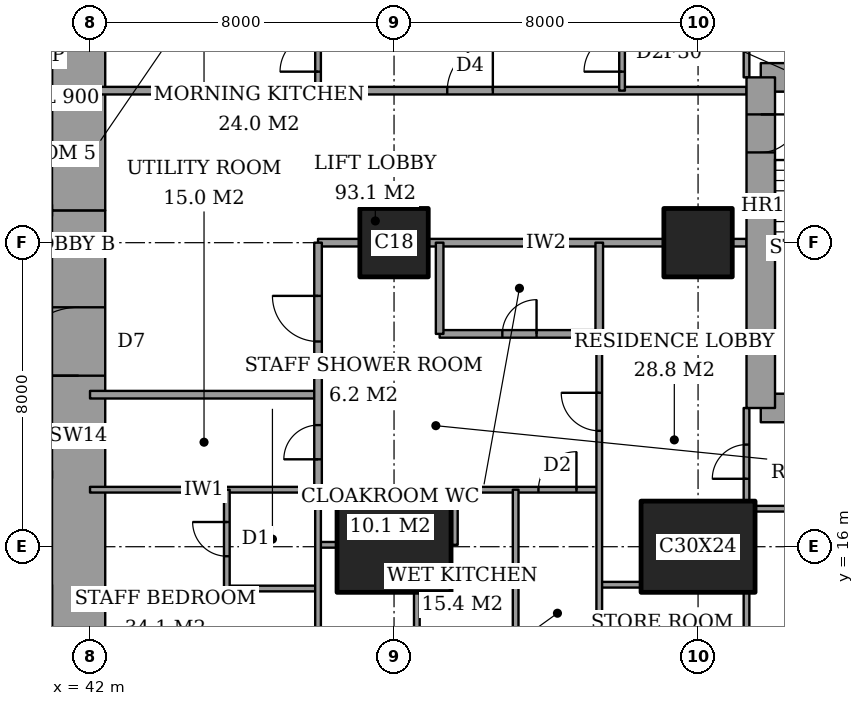
"""IFC4 building model, lengths in metres.
Left out: names, types, materials, properties, quantities, classifications, styles, units other than length and angle.
Written with IfcOpenShell. Run it as: python <this file> out.ifc"""

import sys

from ifc_helpers import new_model, si_unit, direction, frame, frame_2d, origin, origin_2d, place, context, subcontext, project, spatial, rectangle, extrude, element, fill, save


model = new_model("IFC4")
c1 = context("Model", 3, precision=1e-05, world=origin(), true_north=direction((0.0, 1.0)))
c2 = subcontext(c1, "Body", "Model", "MODEL_VIEW")
j1 = project(units=[si_unit("LENGTHUNIT", "METRE"), si_unit("PLANEANGLEUNIT", "RADIAN")], contexts=[c1])
p1 = place(None, origin())
s1 = spatial("IfcSite", under=j1, at=p1, CompositionType="ELEMENT")
p2 = place(p1, origin())
s2 = spatial("IfcBuilding", under=s1, at=p2, CompositionType="ELEMENT")
p3 = place(p2, frame((0.0, 0.0, 211.0)))
s3 = spatial("IfcBuildingStorey", under=s2, at=p3, CompositionType="ELEMENT", Elevation=211.0)
p4 = place(p3, frame((50.0, 16.0, 0.0), z_axis=(0.0, 0.0, 1.0), x_axis=(1.0, 0.0, 0.0)))
e1 = element("IfcColumn", 1, at=p4, inside=s3, PredefinedType="COLUMN", context=c2, shape_type="SweptSolid", body=[
    extrude(rectangle(XDim=3.0, YDim=2.4, at=origin_2d()), origin(), (0.0, 0.0, 1.0), 3.6),
])
p5 = place(p3, frame((50.0, 24.0, 0.0), z_axis=(0.0, 0.0, 1.0), x_axis=(1.0, 0.0, 0.0)))
e2 = element("IfcColumn", 2, at=p5, inside=s3, PredefinedType="COLUMN", context=c2, shape_type="SweptSolid", body=[
    extrude(rectangle(XDim=1.8, YDim=1.8, at=origin_2d()), origin(), (0.0, 0.0, 1.0), 3.6),
])
p6 = place(p3, frame((58.0, 16.0, 0.0), z_axis=(0.0, 0.0, 1.0), x_axis=(1.0, 0.0, 0.0)))
e3 = element("IfcColumn", 3, at=p6, inside=s3, PredefinedType="COLUMN", context=c2, shape_type="SweptSolid", body=[
    extrude(rectangle(XDim=3.0, YDim=2.4, at=origin_2d()), origin(), (0.0, 0.0, 1.0), 3.6),
])
p7 = place(p3, frame((58.0, 24.0, 0.0), z_axis=(0.0, 0.0, 1.0), x_axis=(1.0, 0.0, 0.0)))
e4 = element("IfcColumn", 4, at=p7, inside=s3, PredefinedType="COLUMN", context=c2, shape_type="SweptSolid", body=[
    extrude(rectangle(XDim=1.8, YDim=1.8, at=origin_2d()), origin(), (0.0, 0.0, 1.0), 3.6),
])
p8 = place(p3, frame((41.7, 13.0, 0.0), z_axis=(0.0, 0.0, 1.0), x_axis=(0.0, 1.0, 0.0)))
e5 = element("IfcWall", 5, at=p8, inside=s3, PredefinedType="SHEAR", context=c2, shape_type="SweptSolid", body=[
    extrude(rectangle(XDim=11.85, YDim=1.4, at=frame_2d((5.925, 0.0))), origin(), (0.0, 0.0, 1.0), 3.6),
])
p9 = place(p8, frame((7.5, 0.0, 0.0)))
e6 = element("IfcOpeningElement", 6, at=p9, cuts=e5, PredefinedType="OPENING", context=c2, shape_type="SweptSolid", body=[
    extrude(rectangle(XDim=1.8, YDim=2.4, at=frame_2d((0.9, 1.2))), frame((0.0, 0.71, 0.0), z_axis=(0.0, -1.0, 0.0), x_axis=(1.0, 0.0, 0.0)), (0.0, 0.0, 1.0), 1.42),
])
p10 = place(p3, frame((41.7, 24.85, 0.0), z_axis=(0.0, 0.0, 1.0), x_axis=(0.0, 1.0, 0.0)))
e7 = element("IfcWall", 7, at=p10, inside=s3, PredefinedType="SHEAR", context=c2, shape_type="SweptSolid", body=[
    extrude(rectangle(XDim=10.15, YDim=1.4, at=frame_2d((5.075, 0.0))), origin(), (0.0, 0.0, 1.0), 3.6),
])
for number, where, z_axis, x_axis in (
    (8, (59.65, 19.65, 0.0), (0.0, 0.0, 1.0), (1.0, 0.0, 0.0)),
    (9, (64.1, 28.35, 0.0), (0.0, 0.0, 1.0), (-1.0, 0.0, 0.0)),
):
    element("IfcWall", number, at=place(p3, frame(where, z_axis=z_axis, x_axis=x_axis)), inside=s3, PredefinedType="SHEAR", context=c2, shape_type="SweptSolid", body=[
        extrude(rectangle(XDim=4.45, YDim=0.75, at=frame_2d((2.225, 0.0))), origin(), (0.0, 0.0, 1.0), 3.6),
    ])
p11 = place(p3, frame((59.65, 28.35, 0.0), z_axis=(0.0, 0.0, 1.0), x_axis=(0.0, -1.0, 0.0)))
e10 = element("IfcWall", 10, at=p11, inside=s3, PredefinedType="SHEAR", context=c2, shape_type="SweptSolid", body=[
    extrude(rectangle(XDim=8.7, YDim=0.75, at=frame_2d((4.35, 0.0))), origin(), (0.0, 0.0, 1.0), 3.6),
])
p12 = place(p11, frame((0.975, 0.0, 0.0)))
e11 = element("IfcOpeningElement", 11, at=p12, cuts=e10, PredefinedType="OPENING", context=c2, shape_type="SweptSolid", body=[
    extrude(rectangle(XDim=1.0, YDim=2.1, at=frame_2d((0.5, 1.05))), frame((0.0, 0.385, 0.0), z_axis=(0.0, -1.0, 0.0), x_axis=(1.0, 0.0, 0.0)), (0.0, 0.0, 1.0), 0.77),
])
p13 = place(p3, frame((45.6, 14.9, 0.0), z_axis=(0.0, 0.0, 1.0), x_axis=(1.0, 0.0, 0.0)))
e12 = element("IfcWall", 12, at=p13, inside=s3, PredefinedType="PARTITIONING", context=c2, shape_type="SweptSolid", body=[
    extrude(rectangle(XDim=2.4, YDim=0.15, at=frame_2d((1.2, 0.0))), origin(), (0.0, 0.0, 1.0), 3.35),
])
p14 = place(p3, frame((55.4, 15.0, 0.0), z_axis=(0.0, 0.0, 1.0), x_axis=(1.0, 0.0, 0.0)))
e13 = element("IfcWall", 13, at=p14, inside=s3, PredefinedType="PARTITIONING", context=c2, shape_type="SweptSolid", body=[
    extrude(rectangle(XDim=1.1, YDim=0.15, at=frame_2d((0.55, 0.0))), origin(), (0.0, 0.0, 1.0), 3.35),
])
p15 = place(p3, frame((48.0, 16.05, 0.0), z_axis=(0.0, 0.0, 1.0), x_axis=(1.0, 0.0, 0.0)))
e14 = element("IfcWall", 14, at=p15, inside=s3, PredefinedType="PARTITIONING", context=c2, shape_type="SweptSolid", body=[
    extrude(rectangle(XDim=0.5, YDim=0.15, at=frame_2d((0.25, 0.0))), origin(), (0.0, 0.0, 1.0), 2.634),
])
p16 = place(p3, frame((59.5, 17.0, 0.0), z_axis=(0.0, 0.0, 1.0), x_axis=(1.0, 0.0, 0.0)))
e15 = element("IfcWall", 15, at=p16, inside=s3, PredefinedType="PARTITIONING", context=c2, shape_type="SweptSolid", body=[
    extrude(rectangle(XDim=6.95, YDim=0.15, at=frame_2d((3.475, 0.0))), origin(), (0.0, 0.0, 1.0), 3.35),
])
p17 = place(p3, frame((42.0, 17.5, 0.0), z_axis=(0.0, 0.0, 1.0), x_axis=(1.0, 0.0, 0.0)))
e16 = element("IfcWall", 16, at=p17, inside=s3, PredefinedType="PARTITIONING", context=c2, shape_type="SweptSolid", body=[
    extrude(rectangle(XDim=6.0, YDim=0.15, at=frame_2d((3.0, 0.0))), origin(), (0.0, 0.0, 1.0), 3.35),
])
p18 = place(p3, frame((51.6, 17.5, 0.0), z_axis=(0.0, 0.0, 1.0), x_axis=(1.0, 0.0, 0.0)))
e17 = element("IfcWall", 17, at=p18, inside=s3, PredefinedType="PARTITIONING", context=c2, shape_type="SweptSolid", body=[
    extrude(rectangle(XDim=3.8, YDim=0.15, at=frame_2d((1.9, 0.0))), origin(), (0.0, 0.0, 1.0), 3.35),
])
p19 = place(p18, frame((2.2, 0.0, 0.0)))
e18 = element("IfcOpeningElement", 18, at=p19, cuts=e17, PredefinedType="OPENING", context=c2, shape_type="SweptSolid", body=[
    extrude(rectangle(XDim=1.0, YDim=2.1, at=frame_2d((0.5, 1.05))), frame((0.0, 0.085, 0.0), z_axis=(0.0, -1.0, 0.0), x_axis=(1.0, 0.0, 0.0)), (0.0, 0.0, 1.0), 0.17),
])
p20 = place(p3, frame((42.0, 20.0, 0.0), z_axis=(0.0, 0.0, 1.0), x_axis=(1.0, 0.0, 0.0)))
e19 = element("IfcWall", 19, at=p20, inside=s3, PredefinedType="PARTITIONING", context=c2, shape_type="SweptSolid", body=[
    extrude(rectangle(XDim=6.0, YDim=0.2, at=frame_2d((3.0, 0.0))), origin(), (0.0, 0.0, 1.0), 3.35),
])
p21 = place(p3, frame((51.2, 21.6, 0.0), z_axis=(0.0, 0.0, 1.0), x_axis=(1.0, 0.0, 0.0)))
e20 = element("IfcWall", 20, at=p21, inside=s3, PredefinedType="PARTITIONING", context=c2, shape_type="SweptSolid", body=[
    extrude(rectangle(XDim=4.2, YDim=0.2, at=frame_2d((2.1, 0.0))), origin(), (0.0, 0.0, 1.0), 3.35),
])
p22 = place(p21, frame((1.65, 0.0, 0.0)))
e21 = element("IfcOpeningElement", 21, at=p22, cuts=e20, PredefinedType="OPENING", context=c2, shape_type="SweptSolid", body=[
    extrude(rectangle(XDim=0.9, YDim=2.1, at=frame_2d((0.45, 1.05))), frame((0.0, 0.11, 0.0), z_axis=(0.0, -1.0, 0.0), x_axis=(1.0, 0.0, 0.0)), (0.0, 0.0, 1.0), 0.22),
])
p23 = place(p3, frame((48.0, 24.0, 0.0), z_axis=(0.0, 0.0, 1.0), x_axis=(1.0, 0.0, 0.0)))
e22 = element("IfcWall", 22, at=p23, inside=s3, PredefinedType="PARTITIONING", context=c2, shape_type="SweptSolid", body=[
    extrude(rectangle(XDim=1.1, YDim=0.2, at=frame_2d((0.55, 0.0))), origin(), (0.0, 0.0, 1.0), 3.35),
])
p24 = place(p3, frame((50.9, 24.0, 0.0), z_axis=(0.0, 0.0, 1.0), x_axis=(1.0, 0.0, 0.0)))
e23 = element("IfcWall", 23, at=p24, inside=s3, PredefinedType="PARTITIONING", context=c2, shape_type="SweptSolid", body=[
    extrude(rectangle(XDim=6.2, YDim=0.2, at=frame_2d((3.1, 0.0))), origin(), (0.0, 0.0, 1.0), 3.35),
])
p25 = place(p3, frame((58.9, 24.0, 0.0), z_axis=(0.0, 0.0, 1.0), x_axis=(1.0, 0.0, 0.0)))
e24 = element("IfcWall", 24, at=p25, inside=s3, PredefinedType="PARTITIONING", context=c2, shape_type="SweptSolid", body=[
    extrude(rectangle(XDim=0.375, YDim=0.2, at=frame_2d((0.188, 0.0))), origin(), (0.0, 0.0, 1.0), 3.35),
])
p26 = place(p3, frame((42.0, 28.0, 0.0), z_axis=(0.0, 0.0, 1.0), x_axis=(1.0, 0.0, 0.0)))
e25 = element("IfcWall", 25, at=p26, inside=s3, PredefinedType="PARTITIONING", context=c2, shape_type="SweptSolid", body=[
    extrude(rectangle(XDim=17.275, YDim=0.2, at=frame_2d((8.637, 0.0))), origin(), (0.0, 0.0, 1.0), 3.35),
])
p27 = place(p26, frame((9.4, 0.0, 0.0)))
e26 = element("IfcOpeningElement", 26, at=p27, cuts=e25, PredefinedType="OPENING", context=c2, shape_type="SweptSolid", body=[
    extrude(rectangle(XDim=1.2, YDim=2.4, at=frame_2d((0.6, 1.2))), frame((0.0, 0.11, 0.0), z_axis=(0.0, -1.0, 0.0), x_axis=(1.0, 0.0, 0.0)), (0.0, 0.0, 1.0), 0.22),
])
p28 = place(p3, frame((45.6, 14.9, 0.0), z_axis=(0.0, 0.0, 1.0), x_axis=(0.0, 1.0, 0.0)))
e27 = element("IfcWall", 27, at=p28, inside=s3, PredefinedType="PARTITIONING", context=c2, shape_type="SweptSolid", body=[
    extrude(rectangle(XDim=2.6, YDim=0.15, at=frame_2d((1.3, 0.0))), origin(), (0.0, 0.0, 1.0), 3.35),
])
p29 = place(p28, frame((0.85, 0.0, 0.0)))
e28 = element("IfcOpeningElement", 28, at=p29, cuts=e27, PredefinedType="OPENING", context=c2, shape_type="SweptSolid", body=[
    extrude(rectangle(XDim=0.9, YDim=2.1, at=frame_2d((0.45, 1.05))), frame((0.0, 0.085, 0.0), z_axis=(0.0, -1.0, 0.0), x_axis=(1.0, 0.0, 0.0)), (0.0, 0.0, 1.0), 0.17),
])
p30 = place(p3, frame((48.0, 17.5, 0.0), z_axis=(0.0, 0.0, 1.0), x_axis=(0.0, 1.0, 0.0)))
e29 = element("IfcWall", 29, at=p30, inside=s3, PredefinedType="PARTITIONING", context=c2, shape_type="SweptSolid", body=[
    extrude(rectangle(XDim=6.5, YDim=0.2, at=frame_2d((3.25, 0.0))), origin(), (0.0, 0.0, 1.0), 3.35),
])
p31 = place(p30, frame((3.9, 0.0, 0.0)))
e30 = element("IfcOpeningElement", 30, at=p31, cuts=e29, PredefinedType="OPENING", context=c2, shape_type="SweptSolid", body=[
    extrude(rectangle(XDim=1.2, YDim=2.4, at=frame_2d((0.6, 1.2))), frame((0.0, 0.11, 0.0), z_axis=(0.0, -1.0, 0.0), x_axis=(1.0, 0.0, 0.0)), (0.0, 0.0, 1.0), 0.22),
])
p32 = place(p30, frame((0.8, 0.0, 0.0)))
e31 = element("IfcOpeningElement", 31, at=p32, cuts=e29, PredefinedType="OPENING", context=c2, shape_type="SweptSolid", body=[
    extrude(rectangle(XDim=0.9, YDim=2.1, at=frame_2d((0.45, 1.05))), frame((0.0, 0.11, 0.0), z_axis=(0.0, -1.0, 0.0), x_axis=(1.0, 0.0, 0.0)), (0.0, 0.0, 1.0), 0.22),
])
p33 = place(p3, frame((48.0, 11.0, 0.0), z_axis=(0.0, 0.0, 1.0), x_axis=(0.0, 1.0, 0.0)))
e32 = element("IfcWall", 32, at=p33, inside=s3, PredefinedType="PARTITIONING", context=c2, shape_type="SweptSolid", body=[
    extrude(rectangle(XDim=6.5, YDim=0.15, at=frame_2d((3.25, 0.0))), origin(), (0.0, 0.0, 1.0), 3.35),
])
p34 = place(p3, frame((48.0, 28.0, 0.0), z_axis=(0.0, 0.0, 1.0), x_axis=(0.0, 1.0, 0.0)))
e33 = element("IfcWall", 33, at=p34, inside=s3, PredefinedType="PARTITIONING", context=c2, shape_type="SweptSolid", body=[
    extrude(rectangle(XDim=9.4, YDim=0.15, at=frame_2d((4.7, 0.0))), origin(), (0.0, 0.0, 1.0), 3.35),
])
p35 = place(p34, frame((0.5, 0.0, 0.0)))
e34 = element("IfcOpeningElement", 34, at=p35, cuts=e33, PredefinedType="OPENING", context=c2, shape_type="SweptSolid", body=[
    extrude(rectangle(XDim=1.0, YDim=2.1, at=frame_2d((0.5, 1.05))), frame((0.0, 0.085, 0.0), z_axis=(0.0, -1.0, 0.0), x_axis=(1.0, 0.0, 0.0)), (0.0, 0.0, 1.0), 0.17),
])
p36 = place(p3, frame((50.6, 11.0, 0.0), z_axis=(0.0, 0.0, 1.0), x_axis=(0.0, 1.0, 0.0)))
e35 = element("IfcWall", 35, at=p36, inside=s3, PredefinedType="PARTITIONING", context=c2, shape_type="SweptSolid", body=[
    extrude(rectangle(XDim=3.8, YDim=0.15, at=frame_2d((1.9, 0.0))), origin(), (0.0, 0.0, 1.0), 3.35),
])
p37 = place(p3, frame((51.2, 21.6, 0.0), z_axis=(0.0, 0.0, 1.0), x_axis=(0.0, 1.0, 0.0)))
e36 = element("IfcWall", 36, at=p37, inside=s3, PredefinedType="PARTITIONING", context=c2, shape_type="SweptSolid", body=[
    extrude(rectangle(XDim=2.4, YDim=0.2, at=frame_2d((1.2, 0.0))), origin(), (0.0, 0.0, 1.0), 3.35),
])
p38 = place(p3, frame((51.6, 16.05, 0.0), z_axis=(0.0, 0.0, 1.0), x_axis=(0.0, 1.0, 0.0)))
e37 = element("IfcWall", 37, at=p38, inside=s3, PredefinedType="PARTITIONING", context=c2, shape_type="SweptSolid", body=[
    extrude(rectangle(XDim=1.45, YDim=0.15, at=frame_2d((0.725, 0.0))), origin(), (0.0, 0.0, 1.0), 3.35),
])
p39 = place(p3, frame((53.2, 11.0, 0.0), z_axis=(0.0, 0.0, 1.0), x_axis=(0.0, 1.0, 0.0)))
e38 = element("IfcWall", 38, at=p39, inside=s3, PredefinedType="PARTITIONING", context=c2, shape_type="SweptSolid", body=[
    extrude(rectangle(XDim=6.5, YDim=0.15, at=frame_2d((3.25, 0.0))), origin(), (0.0, 0.0, 1.0), 3.35),
])
p40 = place(p3, frame((55.4, 21.6, 0.0), z_axis=(0.0, 0.0, 1.0), x_axis=(0.0, 1.0, 0.0)))
e39 = element("IfcWall", 39, at=p40, inside=s3, PredefinedType="PARTITIONING", context=c2, shape_type="SweptSolid", body=[
    extrude(rectangle(XDim=2.4, YDim=0.2, at=frame_2d((1.2, 0.0))), origin(), (0.0, 0.0, 1.0), 3.35),
])
p41 = place(p3, frame((55.4, 11.0, 0.0), z_axis=(0.0, 0.0, 1.0), x_axis=(0.0, 1.0, 0.0)))
e40 = element("IfcWall", 40, at=p41, inside=s3, PredefinedType="PARTITIONING", context=c2, shape_type="SweptSolid", body=[
    extrude(rectangle(XDim=10.6, YDim=0.15, at=frame_2d((5.3, 0.0))), origin(), (0.0, 0.0, 1.0), 3.35),
])
p42 = place(p41, frame((8.05, 0.0, 0.0)))
e41 = element("IfcOpeningElement", 41, at=p42, cuts=e40, PredefinedType="OPENING", context=c2, shape_type="SweptSolid", body=[
    extrude(rectangle(XDim=1.0, YDim=2.1, at=frame_2d((0.5, 1.05))), frame((0.0, 0.085, 0.0), z_axis=(0.0, -1.0, 0.0), x_axis=(1.0, 0.0, 0.0)), (0.0, 0.0, 1.0), 0.17),
])
p43 = place(p3, frame((56.0, 28.0, 0.0), z_axis=(0.0, 0.0, 1.0), x_axis=(0.0, 1.0, 0.0)))
e42 = element("IfcWall", 42, at=p43, inside=s3, PredefinedType="PARTITIONING", context=c2, shape_type="SweptSolid", body=[
    extrude(rectangle(XDim=9.4, YDim=0.15, at=frame_2d((4.7, 0.0))), origin(), (0.0, 0.0, 1.0), 3.35),
])
p44 = place(p43, frame((0.5, 0.0, 0.0)))
e43 = element("IfcOpeningElement", 43, at=p44, cuts=e42, PredefinedType="OPENING", context=c2, shape_type="SweptSolid", body=[
    extrude(rectangle(XDim=1.0, YDim=2.1, at=frame_2d((0.5, 1.05))), frame((0.0, 0.085, 0.0), z_axis=(0.0, -1.0, 0.0), x_axis=(1.0, 0.0, 0.0)), (0.0, 0.0, 1.0), 0.17),
])
p45 = place(p3, frame((59.275, 11.0, 0.0), z_axis=(0.0, 0.0, 1.0), x_axis=(0.0, 1.0, 0.0)))
e44 = element("IfcWall", 44, at=p45, inside=s3, PredefinedType="PARTITIONING", context=c2, shape_type="SweptSolid", body=[
    extrude(rectangle(XDim=3.8, YDim=0.15, at=frame_2d((1.9, 0.0))), origin(), (0.0, 0.0, 1.0), 3.35),
])
p46 = place(p3, frame((59.275, 17.2, 0.0), z_axis=(0.0, 0.0, 1.0), x_axis=(0.0, 1.0, 0.0)))
e45 = element("IfcWall", 45, at=p46, inside=s3, PredefinedType="PARTITIONING", context=c2, shape_type="SweptSolid", body=[
    extrude(rectangle(XDim=2.45, YDim=0.15, at=frame_2d((1.225, 0.0))), origin(), (0.0, 0.0, 1.0), 3.35),
])
p47 = place(p46, frame((0.587, 0.0, 0.0)))
e46 = element("IfcOpeningElement", 46, at=p47, cuts=e45, PredefinedType="OPENING", context=c2, shape_type="SweptSolid", body=[
    extrude(rectangle(XDim=0.9, YDim=2.1, at=frame_2d((0.45, 1.05))), frame((0.0, 0.085, 0.0), z_axis=(0.0, -1.0, 0.0), x_axis=(1.0, 0.0, 0.0)), (0.0, 0.0, 1.0), 0.17),
])
p48 = place(p3, frame((59.275, 28.35, 0.0), z_axis=(0.0, 0.0, 1.0), x_axis=(0.0, 1.0, 0.0)))
e47 = element("IfcWall", 47, at=p48, inside=s3, PredefinedType="PARTITIONING", context=c2, shape_type="SweptSolid", body=[
    extrude(rectangle(XDim=2.45, YDim=0.15, at=frame_2d((1.225, 0.0))), origin(), (0.0, 0.0, 1.0), 3.35),
])
p49 = place(p48, frame((0.962, 0.0, 0.0)))
e48 = element("IfcOpeningElement", 48, at=p49, cuts=e47, PredefinedType="OPENING", context=c2, shape_type="SweptSolid", body=[
    extrude(rectangle(XDim=0.9, YDim=2.1, at=frame_2d((0.45, 1.05))), frame((0.0, 0.085, 0.0), z_axis=(0.0, -1.0, 0.0), x_axis=(1.0, 0.0, 0.0)), (0.0, 0.0, 1.0), 0.17),
])
p50 = place(p3, frame((28.3, 17.9, 0.0), z_axis=(0.0, 0.0, 1.0), x_axis=(1.0, 0.0, 0.0)))
e49 = element("IfcWall", 49, at=p50, inside=s3, PredefinedType="PARTITIONING", context=c2, shape_type="SweptSolid", body=[
    extrude(rectangle(XDim=12.7, YDim=0.2, at=frame_2d((6.35, 0.0))), origin(), (0.0, 0.0, 1.0), 3.6),
])
p51 = place(p50, frame((1.05, 0.0, 0.0)))
e50 = element("IfcOpeningElement", 50, at=p51, cuts=e49, PredefinedType="OPENING", context=c2, shape_type="SweptSolid", body=[
    extrude(rectangle(XDim=0.9, YDim=2.1, at=frame_2d((0.45, 1.05))), frame((0.0, 0.11, 0.0), z_axis=(0.0, -1.0, 0.0), x_axis=(1.0, 0.0, 0.0)), (0.0, 0.0, 1.0), 0.22),
])
p52 = place(p50, frame((10.6, 0.0, 0.0)))
e51 = element("IfcOpeningElement", 51, at=p52, cuts=e49, PredefinedType="OPENING", context=c2, shape_type="SweptSolid", body=[
    extrude(rectangle(XDim=1.2, YDim=2.1, at=frame_2d((0.6, 1.05))), frame((0.0, 0.11, 0.0), z_axis=(0.0, -1.0, 0.0), x_axis=(1.0, 0.0, 0.0)), (0.0, 0.0, 1.0), 0.22),
])
p53 = place(p47, origin())
e52 = element("IfcDoor", 52, at=p53, inside=s3, OperationType="SINGLE_SWING_RIGHT", PredefinedType="DOOR", context=c2, shape_type="SweptSolid", body=[
    extrude(rectangle(XDim=0.9, YDim=2.1, at=frame_2d((0.45, 1.05))), frame((0.0, 0.025, 0.0), z_axis=(0.0, -1.0, 0.0), x_axis=(1.0, 0.0, 0.0)), (0.0, 0.0, 1.0), 0.05),
])
fill(e46, e52)
p54 = place(p42, origin())
e53 = element("IfcDoor", 53, at=p54, inside=s3, OperationType="SINGLE_SWING_LEFT", PredefinedType="DOOR", context=c2, shape_type="SweptSolid", body=[
    extrude(rectangle(XDim=1.0, YDim=2.1, at=frame_2d((0.5, 1.05))), frame((0.0, 0.025, 0.0), z_axis=(0.0, -1.0, 0.0), x_axis=(1.0, 0.0, 0.0)), (0.0, 0.0, 1.0), 0.05),
])
fill(e41, e53)
p55 = place(p22, origin())
e54 = element("IfcDoor", 54, at=p55, inside=s3, OperationType="SINGLE_SWING_LEFT", PredefinedType="DOOR", context=c2, shape_type="SweptSolid", body=[
    extrude(rectangle(XDim=0.9, YDim=2.1, at=frame_2d((0.45, 1.05))), frame((0.0, 0.025, 0.0), z_axis=(0.0, -1.0, 0.0), x_axis=(1.0, 0.0, 0.0)), (0.0, 0.0, 1.0), 0.05),
])
fill(e21, e54)
p56 = place(p31, origin())
e55 = element("IfcDoor", 55, at=p56, inside=s3, OperationType="SINGLE_SWING_LEFT", PredefinedType="DOOR", context=c2, shape_type="SweptSolid", body=[
    extrude(rectangle(XDim=1.2, YDim=2.4, at=frame_2d((0.6, 1.2))), frame((0.0, 0.025, 0.0), z_axis=(0.0, -1.0, 0.0), x_axis=(1.0, 0.0, 0.0)), (0.0, 0.0, 1.0), 0.05),
])
fill(e30, e55)
p57 = place(p19, origin())
e56 = element("IfcDoor", 56, at=p57, inside=s3, OperationType="SINGLE_SWING_LEFT", PredefinedType="DOOR", context=c2, shape_type="SweptSolid", body=[
    extrude(rectangle(XDim=1.0, YDim=2.1, at=frame_2d((0.5, 1.05))), frame((0.0, 0.025, 0.0), z_axis=(0.0, -1.0, 0.0), x_axis=(1.0, 0.0, 0.0)), (0.0, 0.0, 1.0), 0.05),
])
fill(e18, e56)
p58 = place(p29, origin())
e57 = element("IfcDoor", 57, at=p58, inside=s3, OperationType="SINGLE_SWING_LEFT", PredefinedType="DOOR", context=c2, shape_type="SweptSolid", body=[
    extrude(rectangle(XDim=0.9, YDim=2.1, at=frame_2d((0.45, 1.05))), frame((0.0, 0.025, 0.0), z_axis=(0.0, -1.0, 0.0), x_axis=(1.0, 0.0, 0.0)), (0.0, 0.0, 1.0), 0.05),
])
fill(e28, e57)
p59 = place(p32, origin())
e58 = element("IfcDoor", 58, at=p59, inside=s3, OperationType="SINGLE_SWING_RIGHT", PredefinedType="DOOR", context=c2, shape_type="SweptSolid", body=[
    extrude(rectangle(XDim=0.9, YDim=2.1, at=frame_2d((0.45, 1.05))), frame((0.0, 0.025, 0.0), z_axis=(0.0, -1.0, 0.0), x_axis=(1.0, 0.0, 0.0)), (0.0, 0.0, 1.0), 0.05),
])
fill(e31, e58)
p60 = place(p44, origin())
e59 = element("IfcDoor", 59, at=p60, inside=s3, OperationType="SINGLE_SWING_RIGHT", PredefinedType="DOOR", context=c2, shape_type="SweptSolid", body=[
    extrude(rectangle(XDim=1.0, YDim=2.1, at=frame_2d((0.5, 1.05))), frame((0.0, 0.025, 0.0), z_axis=(0.0, -1.0, 0.0), x_axis=(1.0, 0.0, 0.0)), (0.0, 0.0, 1.0), 0.05),
])
fill(e43, e59)
p61 = place(p27, origin())
e60 = element("IfcDoor", 60, at=p61, inside=s3, OperationType="SINGLE_SWING_LEFT", PredefinedType="DOOR", context=c2, shape_type="SweptSolid", body=[
    extrude(rectangle(XDim=1.2, YDim=2.4, at=frame_2d((0.6, 1.2))), frame((0.0, 0.025, 0.0), z_axis=(0.0, -1.0, 0.0), x_axis=(1.0, 0.0, 0.0)), (0.0, 0.0, 1.0), 0.05),
])
fill(e26, e60)
p62 = place(p35, origin())
e61 = element("IfcDoor", 61, at=p62, inside=s3, OperationType="SINGLE_SWING_RIGHT", PredefinedType="DOOR", context=c2, shape_type="SweptSolid", body=[
    extrude(rectangle(XDim=1.0, YDim=2.1, at=frame_2d((0.5, 1.05))), frame((0.0, 0.025, 0.0), z_axis=(0.0, -1.0, 0.0), x_axis=(1.0, 0.0, 0.0)), (0.0, 0.0, 1.0), 0.05),
])
fill(e34, e61)
p63 = place(p9, origin())
e62 = element("IfcDoor", 62, at=p63, inside=s3, OperationType="DOUBLE_DOOR_DOUBLE_SWING", PredefinedType="DOOR", context=c2, shape_type="SweptSolid", body=[
    extrude(rectangle(XDim=1.8, YDim=2.4, at=frame_2d((0.9, 1.2))), frame((0.0, 0.025, 0.0), z_axis=(0.0, -1.0, 0.0), x_axis=(1.0, 0.0, 0.0)), (0.0, 0.0, 1.0), 0.05),
])
fill(e6, e62)
p64 = place(p12, origin())
e63 = element("IfcDoor", 63, at=p64, inside=s3, OperationType="SINGLE_SWING_RIGHT", PredefinedType="DOOR", context=c2, shape_type="SweptSolid", body=[
    extrude(rectangle(XDim=1.0, YDim=2.1, at=frame_2d((0.5, 1.05))), frame((0.0, 0.025, 0.0), z_axis=(0.0, -1.0, 0.0), x_axis=(1.0, 0.0, 0.0)), (0.0, 0.0, 1.0), 0.05),
])
fill(e11, e63)
save(model, sys.argv[1])
